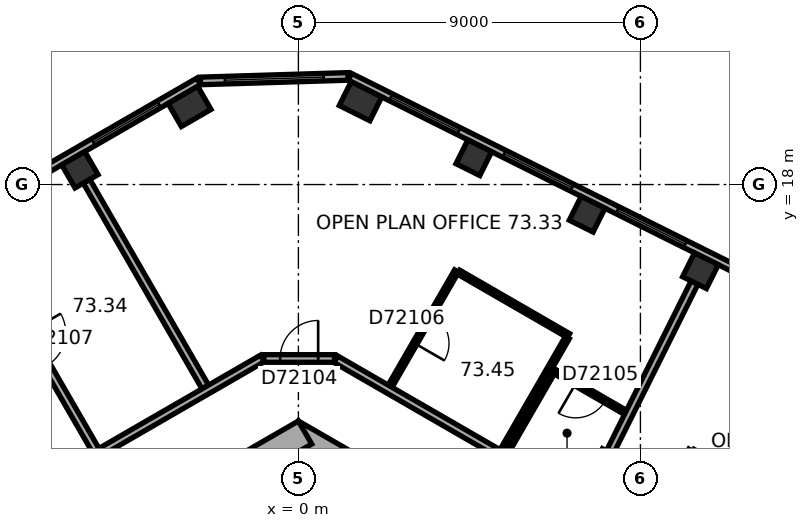
"""IFC4 building model, lengths in metres.
Left out: names, types, materials, properties, quantities, classifications, styles, units other than length and angle.
Written with IfcOpenShell. Run it as: python <this file> out.ifc"""

import sys

from ifc_helpers import new_model, si_unit, direction, frame, frame_2d, origin, origin_2d, place, context, subcontext, project, spatial, rectangle, extrude, element, fill, save


model = new_model("IFC4")
c1 = context("Model", 3, precision=1e-05, world=origin(), true_north=direction((0.0, 1.0)))
c2 = subcontext(c1, "Body", "Model", "MODEL_VIEW")
j1 = project(units=[si_unit("LENGTHUNIT", "METRE"), si_unit("PLANEANGLEUNIT", "RADIAN")], contexts=[c1])
p1 = place(None, origin())
s1 = spatial("IfcSite", under=j1, at=p1, CompositionType="ELEMENT")
p2 = place(p1, origin())
s2 = spatial("IfcBuilding", under=s1, at=p2, CompositionType="ELEMENT")
p3 = place(p2, frame((0.0, 0.0, 296.8)))
s3 = spatial("IfcBuildingStorey", under=s2, at=p3, CompositionType="ELEMENT", Elevation=296.8)
for number, where, z_axis, x_axis in (
    (1, (10.58, 15.732, 0.0), (0.0, 0.0, 1.0), (-0.895, 0.446, 0.0)),
    (2, (7.598, 17.219, 0.0), (0.0, 0.0, 1.0), (-0.895, 0.446, 0.0)),
    (3, (4.616, 18.706, 0.0), (0.0, 0.0, 1.0), (-0.895, 0.446, 0.0)),
):
    element("IfcColumn", number, at=place(p3, frame(where, z_axis=z_axis, x_axis=x_axis)), inside=s3, PredefinedType="COLUMN", context=c2, shape_type="SweptSolid", body=[
        extrude(rectangle(XDim=0.7, YDim=0.7, at=origin_2d()), origin(), (0.0, 0.0, 1.0), 3.7),
    ])
for number, where, z_axis, x_axis in (
    (4, (1.635, 20.192, 0.0), (0.0, 0.0, 1.0), (-0.895, 0.446, 0.0)),
    (5, (-2.864, 20.055, 0.0), (0.0, 0.0, 1.0), (-0.866, -0.5, 0.0)),
):
    element("IfcColumn", number, at=place(p3, frame(where, z_axis=z_axis, x_axis=x_axis)), inside=s3, PredefinedType="COLUMN", context=c2, shape_type="SweptSolid", body=[
        extrude(rectangle(XDim=0.9, YDim=0.7, at=origin_2d()), origin(), (0.0, 0.0, 1.0), 3.7),
    ])
p4 = place(p3, frame((-5.75, 18.389, 0.0), z_axis=(0.0, 0.0, 1.0), x_axis=(-0.866025403784, -0.5, 0.0)))
e6 = element("IfcColumn", 6, at=p4, inside=s3, PredefinedType="COLUMN", context=c2, shape_type="SweptSolid", body=[
    extrude(rectangle(XDim=0.7, YDim=0.7, at=origin_2d()), origin(), (0.0, 0.0, 1.0), 3.7),
])
p5 = place(p3, frame((10.025, 5.586, 0.0), z_axis=(0.0, 0.0, 1.0), x_axis=(-0.866026453023, 0.499998182661, 0.0)))
e7 = element("IfcWall", 7, at=p5, inside=s3, PredefinedType="SHEAR", context=c2, shape_type="SweptSolid", body=[
    extrude(rectangle(XDim=11.778, YDim=0.7, at=frame_2d((5.889, 0.0))), origin(), (0.0, 0.0, 1.0), 3.7),
])
p6 = place(p5, frame((2.539, 0.0, 0.0)))
e8 = element("IfcOpeningElement", 8, at=p6, cuts=e7, PredefinedType="OPENING", context=c2, shape_type="SweptSolid", body=[
    extrude(rectangle(XDim=0.9, YDim=2.1, at=frame_2d((0.45, 1.05))), frame((0.0, 0.36, 0.0), z_axis=(0.0, -1.0, 0.0), x_axis=(1.0, 0.0, 0.0)), (0.0, 0.0, 1.0), 0.72),
])
p7 = place(p5, frame((6.439, 0.0, 0.0)))
e9 = element("IfcOpeningElement", 9, at=p7, cuts=e7, PredefinedType="OPENING", context=c2, shape_type="SweptSolid", body=[
    extrude(rectangle(XDim=0.9, YDim=2.1, at=frame_2d((0.45, 1.05))), frame((0.0, 0.36, 0.0), z_axis=(0.0, -1.0, 0.0), x_axis=(1.0, 0.0, 0.0)), (0.0, 0.0, 1.0), 0.72),
])
p8 = place(p3, frame((0.175, 11.475, 0.0), z_axis=(0.0, 0.0, 1.0), x_axis=(-0.866026453023, -0.499998182661, 0.0)))
e10 = element("IfcWall", 10, at=p8, inside=s3, PredefinedType="SHEAR", context=c2, shape_type="SweptSolid", body=[
    extrude(rectangle(XDim=11.778, YDim=0.7, at=frame_2d((5.889, 0.0))), origin(), (0.0, 0.0, 1.0), 3.7),
])
p9 = place(p8, frame((6.089, 0.0, 0.0)))
e11 = element("IfcOpeningElement", 11, at=p9, cuts=e10, PredefinedType="OPENING", context=c2, shape_type="SweptSolid", body=[
    extrude(rectangle(XDim=1.5, YDim=2.1, at=frame_2d((0.75, 1.05))), frame((0.0, 0.36, 0.0), z_axis=(0.0, -1.0, 0.0), x_axis=(1.0, 0.0, 0.0)), (0.0, 0.0, 1.0), 0.72),
])
p10 = place(p8, frame((2.939, 0.0, 0.0)))
e12 = element("IfcOpeningElement", 12, at=p10, cuts=e10, PredefinedType="OPENING", context=c2, shape_type="SweptSolid", body=[
    extrude(rectangle(XDim=0.9, YDim=2.1, at=frame_2d((0.45, 1.05))), frame((0.0, 0.36, 0.0), z_axis=(0.0, -1.0, 0.0), x_axis=(1.0, 0.0, 0.0)), (0.0, 0.0, 1.0), 0.72),
])
p11 = place(p3, frame((17.223, 12.923, 0.0), z_axis=(0.0, 0.0, 1.0), x_axis=(-0.894930561148, 0.44620543556, 0.0)))
e13 = element("IfcWall", 13, at=p11, inside=s3, PredefinedType="STANDARD", context=c2, shape_type="SweptSolid", body=[
    extrude(rectangle(XDim=17.731, YDim=0.2, at=frame_2d((8.866, 0.0))), origin(), (0.0, 0.0, 1.0), 3.7),
])
p12 = place(p11, frame((1.202, 0.0, 0.9)))
e14 = element("IfcOpeningElement", 14, at=p12, cuts=e13, PredefinedType="OPENING", context=c2, shape_type="SweptSolid", body=[
    extrude(rectangle(XDim=2.0, YDim=2.0, at=frame_2d((1.0, 1.0))), frame((0.0, 0.11, 0.0), z_axis=(0.0, -1.0, 0.0), x_axis=(1.0, 0.0, 0.0)), (0.0, 0.0, 1.0), 0.22),
])
p13 = place(p11, frame((4.533, 0.0, 0.9)))
e15 = element("IfcOpeningElement", 15, at=p13, cuts=e13, PredefinedType="OPENING", context=c2, shape_type="SweptSolid", body=[
    extrude(rectangle(XDim=2.0, YDim=2.0, at=frame_2d((1.0, 1.0))), frame((0.0, 0.11, 0.0), z_axis=(0.0, -1.0, 0.0), x_axis=(1.0, 0.0, 0.0)), (0.0, 0.0, 1.0), 0.22),
])
p14 = place(p11, frame((7.865, 0.0, 0.9)))
e16 = element("IfcOpeningElement", 16, at=p14, cuts=e13, PredefinedType="OPENING", context=c2, shape_type="SweptSolid", body=[
    extrude(rectangle(XDim=2.0, YDim=2.0, at=frame_2d((1.0, 1.0))), frame((0.0, 0.11, 0.0), z_axis=(0.0, -1.0, 0.0), x_axis=(1.0, 0.0, 0.0)), (0.0, 0.0, 1.0), 0.22),
])
p15 = place(p11, frame((11.197, 0.0, 0.9)))
e17 = element("IfcOpeningElement", 17, at=p15, cuts=e13, PredefinedType="OPENING", context=c2, shape_type="SweptSolid", body=[
    extrude(rectangle(XDim=2.0, YDim=2.0, at=frame_2d((1.0, 1.0))), frame((0.0, 0.11, 0.0), z_axis=(0.0, -1.0, 0.0), x_axis=(1.0, 0.0, 0.0)), (0.0, 0.0, 1.0), 0.22),
])
p16 = place(p11, frame((14.528, 0.0, 0.9)))
e18 = element("IfcOpeningElement", 18, at=p16, cuts=e13, PredefinedType="OPENING", context=c2, shape_type="SweptSolid", body=[
    extrude(rectangle(XDim=2.0, YDim=2.0, at=frame_2d((1.0, 1.0))), frame((0.0, 0.11, 0.0), z_axis=(0.0, -1.0, 0.0), x_axis=(1.0, 0.0, 0.0)), (0.0, 0.0, 1.0), 0.22),
])
p17 = place(p3, frame((1.307, 20.845, 0.0), z_axis=(0.0, 0.0, 1.0), x_axis=(-0.999533654813, -0.030536419175, 0.0)))
e19 = element("IfcWall", 19, at=p17, inside=s3, PredefinedType="STANDARD", context=c2, shape_type="SweptSolid", body=[
    extrude(rectangle(XDim=3.885, YDim=0.2, at=frame_2d((1.943, 0.0))), origin(), (0.0, 0.0, 1.0), 3.7),
])
p18 = place(p17, frame((0.643, 0.0, 0.9)))
e20 = element("IfcOpeningElement", 20, at=p18, cuts=e19, PredefinedType="OPENING", context=c2, shape_type="SweptSolid", body=[
    extrude(rectangle(XDim=2.6, YDim=2.0, at=frame_2d((1.3, 1.0))), frame((0.0, 0.11, 0.0), z_axis=(0.0, -1.0, 0.0), x_axis=(1.0, 0.0, 0.0)), (0.0, 0.0, 1.0), 0.22),
])
p19 = place(p3, frame((-2.624, 20.713, 0.0), z_axis=(0.0, 0.0, 1.0), x_axis=(-0.866026460444, -0.499998169808, 0.0)))
e21 = element("IfcWall", 21, at=p19, inside=s3, PredefinedType="STANDARD", context=c2, shape_type="SweptSolid", body=[
    extrude(rectangle(XDim=17.731, YDim=0.2, at=frame_2d((8.866, 0.0))), origin(), (0.0, 0.0, 1.0), 3.7),
])
p20 = place(p19, frame((1.203, 0.0, 0.9)))
e22 = element("IfcOpeningElement", 22, at=p20, cuts=e21, PredefinedType="OPENING", context=c2, shape_type="SweptSolid", body=[
    extrude(rectangle(XDim=2.0, YDim=2.0, at=frame_2d((1.0, 1.0))), frame((0.0, 0.11, 0.0), z_axis=(0.0, -1.0, 0.0), x_axis=(1.0, 0.0, 0.0)), (0.0, 0.0, 1.0), 0.22),
])
p21 = place(p19, frame((4.535, 0.0, 0.9)))
e23 = element("IfcOpeningElement", 23, at=p21, cuts=e21, PredefinedType="OPENING", context=c2, shape_type="SweptSolid", body=[
    extrude(rectangle(XDim=2.0, YDim=2.0, at=frame_2d((1.0, 1.0))), frame((0.0, 0.11, 0.0), z_axis=(0.0, -1.0, 0.0), x_axis=(1.0, 0.0, 0.0)), (0.0, 0.0, 1.0), 0.22),
])
p22 = place(p19, frame((7.867, 0.0, 0.9)))
e24 = element("IfcOpeningElement", 24, at=p22, cuts=e21, PredefinedType="OPENING", context=c2, shape_type="SweptSolid", body=[
    extrude(rectangle(XDim=2.0, YDim=2.0, at=frame_2d((1.0, 1.0))), frame((0.0, 0.11, 0.0), z_axis=(0.0, -1.0, 0.0), x_axis=(1.0, 0.0, 0.0)), (0.0, 0.0, 1.0), 0.22),
])
p23 = place(p19, frame((11.198, 0.0, 0.9)))
e25 = element("IfcOpeningElement", 25, at=p23, cuts=e21, PredefinedType="OPENING", context=c2, shape_type="SweptSolid", body=[
    extrude(rectangle(XDim=2.0, YDim=2.0, at=frame_2d((1.0, 1.0))), frame((0.0, 0.11, 0.0), z_axis=(0.0, -1.0, 0.0), x_axis=(1.0, 0.0, 0.0)), (0.0, 0.0, 1.0), 0.22),
])
p24 = place(p19, frame((14.53, 0.0, 0.9)))
e26 = element("IfcOpeningElement", 26, at=p24, cuts=e21, PredefinedType="OPENING", context=c2, shape_type="SweptSolid", body=[
    extrude(rectangle(XDim=2.0, YDim=2.0, at=frame_2d((1.0, 1.0))), frame((0.0, 0.11, 0.0), z_axis=(0.0, -1.0, 0.0), x_axis=(1.0, 0.0, 0.0)), (0.0, 0.0, 1.0), 0.22),
])
p25 = place(p3, frame((-8.46, 16.42, 0.0), z_axis=(0.0, 0.0, 1.0), x_axis=(0.500005339912, -0.866022320763, 0.0)))
e27 = element("IfcWall", 27, at=p25, inside=s3, PredefinedType="PARTITIONING", context=c2, shape_type="SweptSolid", body=[
    extrude(rectangle(XDim=6.35, YDim=0.2, at=frame_2d((3.175, 0.0))), origin(), (0.0, 0.0, 1.0), 2.65),
])
p26 = place(p25, frame((2.675, 0.0, 0.0)))
e28 = element("IfcOpeningElement", 28, at=p26, cuts=e27, PredefinedType="OPENING", context=c2, shape_type="SweptSolid", body=[
    extrude(rectangle(XDim=1.0, YDim=2.1, at=frame_2d((0.5, 1.05))), frame((0.0, 0.11, 0.0), z_axis=(0.0, -1.0, 0.0), x_axis=(1.0, 0.0, 0.0)), (0.0, 0.0, 1.0), 0.22),
])
p27 = place(p3, frame((-5.575, 18.086, 0.0), z_axis=(0.0, 0.0, 1.0), x_axis=(0.500004234368, -0.866022959057, 0.0)))
e29 = element("IfcWall", 29, at=p27, inside=s3, PredefinedType="PARTITIONING", context=c2, shape_type="SweptSolid", body=[
    extrude(rectangle(XDim=6.25, YDim=0.2, at=frame_2d((3.125, 0.0))), origin(), (0.0, 0.0, 1.0), 3.35),
])
p28 = place(p3, frame((-0.95, 13.423, 0.0), z_axis=(0.0, 0.0, 1.0), x_axis=(-0.86603557629, -0.499982380289, 0.0)))
e30 = element("IfcWall", 30, at=p28, inside=s3, PredefinedType="PARTITIONING", context=c2, shape_type="SweptSolid", body=[
    extrude(rectangle(XDim=4.906, YDim=0.2, at=frame_2d((2.453, 0.0))), origin(), (0.0, 0.0, 1.0), 3.35),
])
p29 = place(p3, frame((0.95, 13.423, 0.0), z_axis=(0.0, 0.0, 1.0), x_axis=(-1.0, 0.0, 0.0)))
e31 = element("IfcWall", 31, at=p29, inside=s3, PredefinedType="PARTITIONING", context=c2, shape_type="SweptSolid", body=[
    extrude(rectangle(XDim=1.86, YDim=0.2, at=frame_2d((0.93, 0.0))), origin(), (0.0, 0.0, 1.0), 3.35),
])
p30 = place(p29, frame((0.43, 0.0, 0.0)))
e32 = element("IfcOpeningElement", 32, at=p30, cuts=e31, PredefinedType="OPENING", context=c2, shape_type="SweptSolid", body=[
    extrude(rectangle(XDim=1.0, YDim=2.1, at=frame_2d((0.5, 1.05))), frame((0.0, 0.11, 0.0), z_axis=(0.0, -1.0, 0.0), x_axis=(1.0, 0.0, 0.0)), (0.0, 0.0, 1.0), 0.22),
])
p31 = place(p3, frame((2.413, 12.694, 0.0), z_axis=(0.0, 0.0, 1.0), x_axis=(0.500010275428, 0.866019471182, 0.0)))
e33 = element("IfcWall", 33, at=p31, inside=s3, PredefinedType="PARTITIONING", context=c2, shape_type="SweptSolid", body=[
    extrude(rectangle(XDim=3.5, YDim=0.12, at=frame_2d((1.75, 0.0))), origin(), (0.0, 0.0, 1.0), 3.35),
])
p32 = place(p31, frame((1.3, 0.0, 0.0)))
e34 = element("IfcOpeningElement", 34, at=p32, cuts=e33, PredefinedType="OPENING", context=c2, shape_type="SweptSolid", body=[
    extrude(rectangle(XDim=0.9, YDim=2.1, at=frame_2d((0.45, 1.05))), frame((0.0, 0.07, 0.0), z_axis=(0.0, -1.0, 0.0), x_axis=(1.0, 0.0, 0.0)), (0.0, 0.0, 1.0), 0.14),
])
p33 = place(p3, frame((4.215, 15.695, 0.0), z_axis=(0.0, 0.0, 1.0), x_axis=(0.865989591418, -0.50006202371, 0.0)))
e35 = element("IfcWall", 35, at=p33, inside=s3, PredefinedType="PARTITIONING", context=c2, shape_type="SweptSolid", body=[
    extrude(rectangle(XDim=3.34, YDim=0.12, at=frame_2d((1.67, 0.0))), origin(), (0.0, 0.0, 1.0), 3.35),
])
p34 = place(p3, frame((5.308, 10.907, 0.0), z_axis=(0.0, 0.0, 1.0), x_axis=(-0.866028394472, 0.499994819941, 0.0)))
e36 = element("IfcWall", 36, at=p34, inside=s3, PredefinedType="PARTITIONING", context=c2, shape_type="SweptSolid", body=[
    extrude(rectangle(XDim=4.992, YDim=0.2, at=frame_2d((2.496, 0.0))), origin(), (0.0, 0.0, 1.0), 3.35),
])
p35 = place(p3, frame((5.461, 10.934, 0.0), z_axis=(0.0, 0.0, 1.0), x_axis=(0.500004234368, 0.866022959057, 0.0)))
e37 = element("IfcWall", 37, at=p35, inside=s3, PredefinedType="PARTITIONING", context=c2, shape_type="SweptSolid", body=[
    extrude(rectangle(XDim=2.5, YDim=0.12, at=frame_2d((1.25, 0.0))), origin(), (0.0, 0.0, 1.0), 3.35),
])
p36 = place(p3, frame((6.763, 13.069, 0.0), z_axis=(0.0, 0.0, 1.0), x_axis=(0.866019511163, -0.500010206181, 0.0)))
e38 = element("IfcWall", 38, at=p36, inside=s3, PredefinedType="PARTITIONING", context=c2, shape_type="SweptSolid", body=[
    extrude(rectangle(XDim=2.13, YDim=0.12, at=frame_2d((1.065, 0.0))), origin(), (0.0, 0.0, 1.0), 3.35),
])
p37 = place(p36, frame((0.615, 0.0, 0.0)))
e39 = element("IfcOpeningElement", 39, at=p37, cuts=e38, PredefinedType="OPENING", context=c2, shape_type="SweptSolid", body=[
    extrude(rectangle(XDim=0.9, YDim=2.1, at=frame_2d((0.45, 1.05))), frame((0.0, 0.07, 0.0), z_axis=(0.0, -1.0, 0.0), x_axis=(1.0, 0.0, 0.0)), (0.0, 0.0, 1.0), 0.14),
])
p38 = place(p3, frame((7.077, 13.973, 0.0), z_axis=(0.0, 0.0, 1.0), x_axis=(-0.499955923987, -0.866050849587, 0.0)))
e40 = element("IfcWall", 40, at=p38, inside=s3, PredefinedType="PARTITIONING", context=c2, shape_type="SweptSolid", body=[
    extrude(rectangle(XDim=3.44, YDim=0.12, at=frame_2d((1.72, 0.0))), origin(), (0.0, 0.0, 1.0), 3.35),
])
p39 = place(p3, frame((10.423, 15.419, 0.0), z_axis=(0.0, 0.0, 1.0), x_axis=(-0.446202606517, -0.894931971681, 0.0)))
e41 = element("IfcWall", 41, at=p39, inside=s3, PredefinedType="PARTITIONING", context=c2, shape_type="SweptSolid", body=[
    extrude(rectangle(XDim=6.377, YDim=0.2, at=frame_2d((3.188, 0.0))), origin(), (0.0, 0.0, 1.0), 2.65),
])
p40 = place(p14, origin())
e42 = element("IfcWindow", 42, at=p40, inside=s3, PartitioningType="SINGLE_PANEL", PredefinedType="WINDOW", context=c2, shape_type="SweptSolid", body=[
    extrude(rectangle(XDim=2.0, YDim=2.0, at=frame_2d((1.0, 1.0))), frame((0.0, 0.03, 0.0), z_axis=(0.0, -1.0, 0.0), x_axis=(1.0, 0.0, 0.0)), (0.0, 0.0, 1.0), 0.06),
])
fill(e16, e42)
p41 = place(p15, origin())
e43 = element("IfcWindow", 43, at=p41, inside=s3, PartitioningType="SINGLE_PANEL", PredefinedType="WINDOW", context=c2, shape_type="SweptSolid", body=[
    extrude(rectangle(XDim=2.0, YDim=2.0, at=frame_2d((1.0, 1.0))), frame((0.0, 0.03, 0.0), z_axis=(0.0, -1.0, 0.0), x_axis=(1.0, 0.0, 0.0)), (0.0, 0.0, 1.0), 0.06),
])
fill(e17, e43)
p42 = place(p16, origin())
e44 = element("IfcWindow", 44, at=p42, inside=s3, PartitioningType="SINGLE_PANEL", PredefinedType="WINDOW", context=c2, shape_type="SweptSolid", body=[
    extrude(rectangle(XDim=2.0, YDim=2.0, at=frame_2d((1.0, 1.0))), frame((0.0, 0.03, 0.0), z_axis=(0.0, -1.0, 0.0), x_axis=(1.0, 0.0, 0.0)), (0.0, 0.0, 1.0), 0.06),
])
fill(e18, e44)
p43 = place(p18, origin())
e45 = element("IfcWindow", 45, at=p43, inside=s3, PartitioningType="SINGLE_PANEL", PredefinedType="WINDOW", context=c2, shape_type="SweptSolid", body=[
    extrude(rectangle(XDim=2.6, YDim=2.0, at=frame_2d((1.3, 1.0))), frame((0.0, 0.03, 0.0), z_axis=(0.0, -1.0, 0.0), x_axis=(1.0, 0.0, 0.0)), (0.0, 0.0, 1.0), 0.06),
])
fill(e20, e45)
p44 = place(p20, origin())
e46 = element("IfcWindow", 46, at=p44, inside=s3, PartitioningType="SINGLE_PANEL", PredefinedType="WINDOW", context=c2, shape_type="SweptSolid", body=[
    extrude(rectangle(XDim=2.0, YDim=2.0, at=frame_2d((1.0, 1.0))), frame((0.0, 0.03, 0.0), z_axis=(0.0, -1.0, 0.0), x_axis=(1.0, 0.0, 0.0)), (0.0, 0.0, 1.0), 0.06),
])
fill(e22, e46)
p45 = place(p30, origin())
e47 = element("IfcDoor", 47, at=p45, inside=s3, OperationType="SINGLE_SWING_LEFT", PredefinedType="DOOR", context=c2, shape_type="SweptSolid", body=[
    extrude(rectangle(XDim=1.0, YDim=2.1, at=frame_2d((0.5, 1.05))), frame((0.0, 0.025, 0.0), z_axis=(0.0, -1.0, 0.0), x_axis=(1.0, 0.0, 0.0)), (0.0, 0.0, 1.0), 0.05),
])
fill(e32, e47)
p46 = place(p37, origin())
e48 = element("IfcDoor", 48, at=p46, inside=s3, OperationType="SINGLE_SWING_LEFT", PredefinedType="DOOR", context=c2, shape_type="SweptSolid", body=[
    extrude(rectangle(XDim=0.9, YDim=2.1, at=frame_2d((0.45, 1.05))), frame((0.0, 0.025, 0.0), z_axis=(0.0, -1.0, 0.0), x_axis=(1.0, 0.0, 0.0)), (0.0, 0.0, 1.0), 0.05),
])
fill(e39, e48)
p47 = place(p32, origin())
e49 = element("IfcDoor", 49, at=p47, inside=s3, OperationType="SINGLE_SWING_LEFT", PredefinedType="DOOR", context=c2, shape_type="SweptSolid", body=[
    extrude(rectangle(XDim=0.9, YDim=2.1, at=frame_2d((0.45, 1.05))), frame((0.0, 0.025, 0.0), z_axis=(0.0, -1.0, 0.0), x_axis=(1.0, 0.0, 0.0)), (0.0, 0.0, 1.0), 0.05),
])
fill(e34, e49)
save(model, sys.argv[1])
